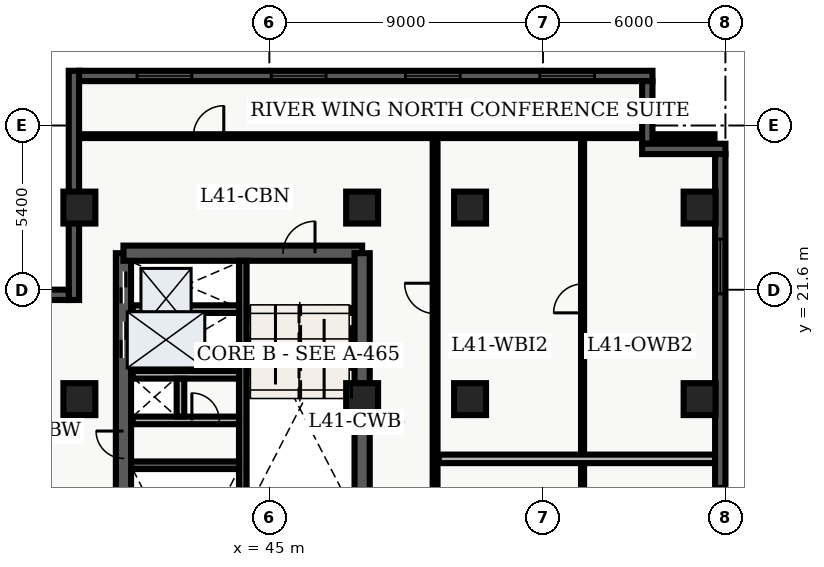
"""IFC4 building model, lengths in metres.
Left out: names, types, materials, properties, quantities, classifications, styles, units other than length and angle.
Written with IfcOpenShell. Run it as: python <this file> out.ifc"""

import sys

from ifc_helpers import new_model, entity, si_unit, converted_unit, direction, frame, origin_with_axes, origin_2d_with_axis, place, context, subcontext, project, spatial, polyline, rectangle, outline, extrude, element, fill, save


model = new_model("IFC4")
c1 = context("Model", 3, precision=1e-05, world=origin_with_axes(), true_north=direction((0.0, 1.0)))
c2 = subcontext(c1, "Body", "Model", "MODEL_VIEW")
j1 = project(units=[si_unit("LENGTHUNIT", "METRE"), converted_unit("PLANEANGLEUNIT", "DEGREE", entity("IfcPlaneAngleMeasure", 0.017), si_unit("PLANEANGLEUNIT", "RADIAN"), dimensions=[0, 0, 0, 0, 0, 0, 0])], contexts=[c1])
p1 = place(None, origin_with_axes())
s1 = spatial("IfcSite", under=j1, at=p1, CompositionType="ELEMENT")
p2 = place(p1, origin_with_axes())
s2 = spatial("IfcBuilding", under=s1, at=p2, CompositionType="ELEMENT")
p3 = place(p2, frame((0.0, 0.0, 168.0), z_axis=(0.0, 0.0, 1.0), x_axis=(1.0, 0.0, 0.0)))
s3 = spatial("IfcBuildingStorey", under=s2, at=p3, CompositionType="ELEMENT", Elevation=168.0)
p4 = place(p3, frame((40.2, 7.2, 0.0), z_axis=(0.0, 0.0, 1.0), x_axis=(0.0, 1.0, 0.0)))
e1 = element("IfcWall", 1, at=p4, inside=s3, PredefinedType="SHEAR", context=c2, shape_type="SweptSolid", body=[
    extrude(outline(polyline([(0.0, -0.25), (15.6, -0.25), (15.6, 0.25), (0.0, 0.25), (0.0, -0.25)])), origin_with_axes(), (0.0, 0.0, 1.0), 3.66),
])
p5 = place(p4, frame((14.475, 0.0, 0.0), z_axis=(0.0, 0.0, 1.0), x_axis=(1.0, 0.0, 0.0)))
e2 = element("IfcOpeningElement", 2, at=p5, cuts=e1, PredefinedType="OPENING", context=c2, shape_type="SweptSolid", body=[
    extrude(rectangle(XDim=1.05, YDim=0.52, at=origin_2d_with_axis()), origin_with_axes(), (0.0, 0.0, 1.0), 2.15),
])
p6 = place(p4, frame((12.75, 0.0, 0.0), z_axis=(0.0, 0.0, 1.0), x_axis=(1.0, 0.0, 0.0)))
e3 = element("IfcOpeningElement", 3, at=p6, cuts=e1, PredefinedType="OPENING", context=c2, shape_type="SweptSolid", body=[
    extrude(rectangle(XDim=1.2, YDim=0.52, at=origin_2d_with_axis()), origin_with_axes(), (0.0, 0.0, 1.0), 2.15),
])
p7 = place(p4, frame((9.3, 0.0, 0.0), z_axis=(0.0, 0.0, 1.0), x_axis=(1.0, 0.0, 0.0)))
e4 = element("IfcOpeningElement", 4, at=p7, cuts=e1, PredefinedType="OPENING", context=c2, shape_type="SweptSolid", body=[
    extrude(rectangle(XDim=0.9, YDim=0.52, at=origin_2d_with_axis()), origin_with_axes(), (0.0, 0.0, 1.0), 2.15),
])
p8 = place(p3, frame((40.2, 22.8, 0.0), z_axis=(0.0, 0.0, 1.0), x_axis=(1.0, 0.0, 0.0)))
e5 = element("IfcWall", 5, at=p8, inside=s3, PredefinedType="SHEAR", context=c2, shape_type="SweptSolid", body=[
    extrude(outline(polyline([(0.0, -0.25), (7.85, -0.25), (7.85, 0.25), (0.0, 0.25), (0.0, -0.25)])), origin_with_axes(), (0.0, 0.0, 1.0), 3.66),
])
p9 = place(p8, frame((5.775, 0.0, 0.0), z_axis=(0.0, 0.0, 1.0), x_axis=(1.0, 0.0, 0.0)))
e6 = element("IfcOpeningElement", 6, at=p9, cuts=e5, PredefinedType="OPENING", context=c2, shape_type="SweptSolid", body=[
    extrude(rectangle(XDim=1.05, YDim=0.52, at=origin_2d_with_axis()), origin_with_axes(), (0.0, 0.0, 1.0), 2.15),
])
p10 = place(p3, frame((48.05, 7.2, 0.0), z_axis=(0.0, 0.0, 1.0), x_axis=(0.0, 1.0, 0.0)))
e7 = element("IfcWall", 7, at=p10, inside=s3, PredefinedType="SHEAR", context=c2, shape_type="SweptSolid", body=[
    extrude(outline(polyline([(0.0, -0.25), (15.6, -0.25), (15.6, 0.25), (0.0, 0.25), (0.0, -0.25)])), origin_with_axes(), (0.0, 0.0, 1.0), 3.66),
])
p11 = place(p10, frame((5.975, 0.0, 0.0), z_axis=(0.0, 0.0, 1.0), x_axis=(1.0, 0.0, 0.0)))
e8 = element("IfcOpeningElement", 8, at=p11, cuts=e7, PredefinedType="OPENING", context=c2, shape_type="SweptSolid", body=[
    extrude(rectangle(XDim=1.05, YDim=0.52, at=origin_2d_with_axis()), origin_with_axes(), (0.0, 0.0, 1.0), 2.15),
])
p12 = place(p10, frame((2.725, 0.0, 0.0), z_axis=(0.0, 0.0, 1.0), x_axis=(1.0, 0.0, 0.0)))
e9 = element("IfcOpeningElement", 9, at=p12, cuts=e7, PredefinedType="OPENING", context=c2, shape_type="SweptSolid", body=[
    extrude(rectangle(XDim=0.95, YDim=0.52, at=origin_2d_with_axis()), origin_with_axes(), (0.0, 0.0, 1.0), 2.15),
])
p13 = place(p3, frame((44.125, 7.45, 0.0), z_axis=(0.0, 0.0, 1.0), x_axis=(0.0, 1.0, 0.0)))
e10 = element("IfcWall", 10, at=p13, inside=s3, PredefinedType="SHEAR", context=c2, shape_type="SweptSolid", body=[
    extrude(outline(polyline([(0.0, -0.125), (15.1, -0.125), (15.1, 0.125), (0.0, 0.125), (0.0, -0.125)])), origin_with_axes(), (0.0, 0.0, 1.0), 3.66),
])
p14 = place(p3, frame((40.45, 15.825, 0.0), z_axis=(0.0, 0.0, 1.0), x_axis=(1.0, 0.0, 0.0)))
e11 = element("IfcWall", 11, at=p14, inside=s3, PredefinedType="SHEAR", context=c2, shape_type="SweptSolid", body=[
    extrude(outline(polyline([(0.0, -0.125), (3.55, -0.125), (3.55, 0.125), (0.0, 0.125), (0.0, -0.125)])), origin_with_axes(), (0.0, 0.0, 1.0), 3.66),
])
p15 = place(p3, frame((40.5, 17.3, 0.0), z_axis=(0.0, 0.0, 1.0), x_axis=(1.0, 0.0, 0.0)))
e12 = element("IfcWall", 12, at=p15, inside=s3, PredefinedType="SOLIDWALL", context=c2, shape_type="SweptSolid", body=[
    extrude(outline(polyline([(0.0, -0.125), (3.5, -0.125), (3.5, 0.125), (0.0, 0.125), (0.0, -0.125)])), origin_with_axes(), (0.0, 0.0, 1.0), 2.7),
])
p16 = place(p15, frame((2.4, 0.0, 0.0), z_axis=(0.0, 0.0, 1.0), x_axis=(1.0, 0.0, 0.0)))
e13 = element("IfcOpeningElement", 13, at=p16, cuts=e12, PredefinedType="OPENING", context=c2, shape_type="SweptSolid", body=[
    extrude(rectangle(XDim=0.9, YDim=0.27, at=origin_2d_with_axis()), origin_with_axes(), (0.0, 0.0, 1.0), 2.15),
])
p17 = place(p3, frame((40.5, 18.8, 0.0), z_axis=(0.0, 0.0, 1.0), x_axis=(1.0, 0.0, 0.0)))
e14 = element("IfcWall", 14, at=p17, inside=s3, PredefinedType="SOLIDWALL", context=c2, shape_type="SweptSolid", body=[
    extrude(outline(polyline([(0.0, -0.125), (3.5, -0.125), (3.5, 0.125), (0.0, 0.125), (0.0, -0.125)])), origin_with_axes(), (0.0, 0.0, 1.0), 2.7),
])
p18 = place(p3, frame((42.075, 17.43, 0.0), z_axis=(0.0, 0.0, 1.0), x_axis=(0.0, 1.0, 0.0)))
e15 = element("IfcWall", 15, at=p18, inside=s3, PredefinedType="SOLIDWALL", context=c2, shape_type="SweptSolid", body=[
    extrude(outline(polyline([(0.0, -0.125), (1.24, -0.125), (1.24, 0.125), (0.0, 0.125), (0.0, -0.125)])), origin_with_axes(), (0.0, 0.0, 1.0), 2.7),
])
for number, where, z_axis, x_axis in (
    (16, (38.75, 18.0, 0.0), (0.0, 0.0, 1.0), (1.0, 0.0, 0.0)),
    (17, (38.75, 24.3, 0.0), (0.0, 0.0, 1.0), (1.0, 0.0, 0.0)),
    (18, (48.05, 18.0, 0.0), (0.0, 0.0, 1.0), (1.0, 0.0, 0.0)),
    (19, (48.05, 24.3, 0.0), (0.0, 0.0, 1.0), (1.0, 0.0, 0.0)),
    (20, (51.6, 18.0, 0.0), (0.0, 0.0, 1.0), (1.0, 0.0, 0.0)),
    (21, (51.6, 24.3, 0.0), (0.0, 0.0, 1.0), (1.0, 0.0, 0.0)),
    (22, (59.15, 18.0, 0.0), (0.0, 0.0, 1.0), (1.0, 0.0, 0.0)),
    (23, (59.15, 24.3, 0.0), (0.0, 0.0, 1.0), (1.0, 0.0, 0.0)),
):
    element("IfcColumn", number, at=place(p3, frame(where, z_axis=z_axis, x_axis=x_axis)), inside=s3, PredefinedType="COLUMN", context=c2, shape_type="SweptSolid", body=[
        extrude(rectangle(XDim=1.05, YDim=1.05, at=origin_2d_with_axis()), origin_with_axes(), (0.0, 0.0, 1.0), 3.9),
    ])
p19 = place(p3, frame((40.5, 20.96, 0.0), z_axis=(0.0, 0.0, 1.0), x_axis=(1.0, 0.0, 0.0)))
e24 = element("IfcWall", 24, at=p19, inside=s3, PredefinedType="SOLIDWALL", context=c2, shape_type="SweptSolid", body=[
    extrude(outline(polyline([(0.0, -0.125), (3.5, -0.125), (3.5, 0.125), (0.0, 0.125), (0.0, -0.125)])), origin_with_axes(), (0.0, 0.0, 1.0), 2.7),
])
p20 = place(p3, frame((50.45, 7.85, 0.0), z_axis=(0.0, 0.0, 1.0), x_axis=(0.0, 1.0, 0.0)))
e25 = element("IfcWall", 25, at=p20, inside=s3, PredefinedType="PARTITIONING", context=c2, shape_type="SweptSolid", body=[
    extrude(outline(polyline([(0.0, -0.08), (18.8, -0.08), (18.8, 0.08), (0.0, 0.08), (0.0, -0.08)])), origin_with_axes(), (0.0, 0.0, 1.0), 2.7),
])
p21 = place(p20, frame((4.122, 0.0, 0.0), z_axis=(0.0, 0.0, 1.0), x_axis=(1.0, 0.0, 0.0)))
e26 = element("IfcOpeningElement", 26, at=p21, cuts=e25, PredefinedType="OPENING", context=c2, shape_type="SweptSolid", body=[
    extrude(rectangle(XDim=1.0, YDim=0.18, at=origin_2d_with_axis()), origin_with_axes(), (0.0, 0.0, 1.0), 2.15),
])
p22 = place(p20, frame((13.463, 0.0, 0.0), z_axis=(0.0, 0.0, 1.0), x_axis=(1.0, 0.0, 0.0)))
e27 = element("IfcOpeningElement", 27, at=p22, cuts=e25, PredefinedType="OPENING", context=c2, shape_type="SweptSolid", body=[
    extrude(rectangle(XDim=1.0, YDim=0.18, at=origin_2d_with_axis()), origin_with_axes(), (0.0, 0.0, 1.0), 2.15),
])
p23 = place(p3, frame((38.735, 26.65, 0.0), z_axis=(0.0, 0.0, 1.0), x_axis=(1.0, 0.0, 0.0)))
e28 = element("IfcWall", 28, at=p23, inside=s3, PredefinedType="PARTITIONING", context=c2, shape_type="SweptSolid", body=[
    extrude(outline(polyline([(0.0, -0.062), (20.905, -0.062), (20.905, 0.062), (0.0, 0.062), (0.0, -0.062)])), origin_with_axes(), (0.0, 0.0, 1.0), 2.7),
])
p24 = place(p23, frame((4.265, 0.0, 0.0), z_axis=(0.0, 0.0, 1.0), x_axis=(1.0, 0.0, 0.0)))
e29 = element("IfcOpeningElement", 29, at=p24, cuts=e28, PredefinedType="OPENING", context=c2, shape_type="SweptSolid", body=[
    extrude(rectangle(XDim=1.0, YDim=0.145, at=origin_2d_with_axis()), origin_with_axes(), (0.0, 0.0, 1.0), 2.15),
])
p25 = place(p3, frame((55.3, 7.98, 0.0), z_axis=(0.0, 0.0, 1.0), x_axis=(0.0, 1.0, 0.0)))
e30 = element("IfcWall", 30, at=p25, inside=s3, PredefinedType="PARTITIONING", context=c2, shape_type="SweptSolid", body=[
    extrude(outline(polyline([(0.0, -0.05), (18.54, -0.05), (18.54, 0.05), (0.0, 0.05), (0.0, -0.05)])), origin_with_axes(), (0.0, 0.0, 1.0), 2.7),
])
p26 = place(p25, frame((3.993, 0.0, 0.0), z_axis=(0.0, 0.0, 1.0), x_axis=(1.0, 0.0, 0.0)))
e31 = element("IfcOpeningElement", 31, at=p26, cuts=e30, PredefinedType="OPENING", context=c2, shape_type="SweptSolid", body=[
    extrude(rectangle(XDim=0.95, YDim=0.12, at=origin_2d_with_axis()), origin_with_axes(), (0.0, 0.0, 1.0), 2.15),
])
p27 = place(p25, frame((13.332, 0.0, 0.0), z_axis=(0.0, 0.0, 1.0), x_axis=(1.0, 0.0, 0.0)))
e32 = element("IfcOpeningElement", 32, at=p27, cuts=e30, PredefinedType="OPENING", context=c2, shape_type="SweptSolid", body=[
    extrude(rectangle(XDim=0.95, YDim=0.12, at=origin_2d_with_axis()), origin_with_axes(), (0.0, 0.0, 1.0), 2.15),
])
p28 = place(p3, frame((50.57, 16.035, 0.0), z_axis=(0.0, 0.0, 1.0), x_axis=(1.0, 0.0, 0.0)))
e33 = element("IfcWall", 33, at=p28, inside=s3, PredefinedType="PARTITIONING", context=c2, shape_type="SweptSolid", body=[
    extrude(outline(polyline([(0.0, -0.14), (9.095, -0.14), (9.095, 0.14), (0.0, 0.14), (0.0, -0.14)])), origin_with_axes(), (0.0, 0.0, 1.0), 2.7),
])
p29 = place(p3, frame((38.57, 21.26, 0.0), z_axis=(0.0, 0.0, 1.0), x_axis=(0.0, 1.0, 0.0)))
e34 = element("IfcWall", 34, at=p29, inside=s3, PredefinedType="SOLIDWALL", context=c2, shape_type="SweptSolid", body=[
    extrude(outline(polyline([(0.0, -0.17), (7.54, -0.17), (7.54, 0.17), (0.0, 0.17), (0.0, -0.17)])), origin_with_axes(), (0.0, 0.0, 1.0), 3.66),
])
p30 = place(p3, frame((38.74, 28.63, 0.0), z_axis=(0.0, 0.0, 1.0), x_axis=(1.0, 0.0, 0.0)))
e35 = element("IfcWall", 35, at=p30, inside=s3, PredefinedType="SOLIDWALL", context=c2, shape_type="SweptSolid", body=[
    extrude(outline(polyline([(0.0, -0.17), (18.86, -0.17), (18.86, 0.17), (0.0, 0.17), (0.0, -0.17)])), origin_with_axes(), (0.0, 0.0, 1.0), 3.66),
])
p31 = place(p30, frame((2.808, 0.0, 0.45), z_axis=(0.0, 0.0, 1.0), x_axis=(1.0, 0.0, 0.0)))
e36 = element("IfcOpeningElement", 36, at=p31, cuts=e35, PredefinedType="OPENING", context=c2, shape_type="SweptSolid", body=[
    extrude(rectangle(XDim=1.8, YDim=0.36, at=origin_2d_with_axis()), origin_with_axes(), (0.0, 0.0, 1.0), 2.1),
])
p32 = place(p30, frame((7.222, 0.0, 0.45), z_axis=(0.0, 0.0, 1.0), x_axis=(1.0, 0.0, 0.0)))
e37 = element("IfcOpeningElement", 37, at=p32, cuts=e35, PredefinedType="OPENING", context=c2, shape_type="SweptSolid", body=[
    extrude(rectangle(XDim=1.8, YDim=0.36, at=origin_2d_with_axis()), origin_with_axes(), (0.0, 0.0, 1.0), 2.1),
])
p33 = place(p30, frame((11.637, 0.0, 0.45), z_axis=(0.0, 0.0, 1.0), x_axis=(1.0, 0.0, 0.0)))
e38 = element("IfcOpeningElement", 38, at=p33, cuts=e35, PredefinedType="OPENING", context=c2, shape_type="SweptSolid", body=[
    extrude(rectangle(XDim=1.8, YDim=0.36, at=origin_2d_with_axis()), origin_with_axes(), (0.0, 0.0, 1.0), 2.1),
])
p34 = place(p30, frame((16.053, 0.0, 0.45), z_axis=(0.0, 0.0, 1.0), x_axis=(1.0, 0.0, 0.0)))
e39 = element("IfcOpeningElement", 39, at=p34, cuts=e35, PredefinedType="OPENING", context=c2, shape_type="SweptSolid", body=[
    extrude(rectangle(XDim=1.8, YDim=0.36, at=origin_2d_with_axis()), origin_with_axes(), (0.0, 0.0, 1.0), 2.1),
])
p35 = place(p3, frame((57.43, 28.46, 0.0), z_axis=(0.0, 0.0, 1.0), x_axis=(0.0, -1.0, 0.0)))
e40 = element("IfcWall", 40, at=p35, inside=s3, PredefinedType="SOLIDWALL", context=c2, shape_type="SweptSolid", body=[
    extrude(outline(polyline([(0.0, -0.17), (2.06, -0.17), (2.06, 0.17), (0.0, 0.17), (0.0, -0.17)])), origin_with_axes(), (0.0, 0.0, 1.0), 3.66),
])
p36 = place(p3, frame((57.26, 26.23, 0.0), z_axis=(0.0, 0.0, 1.0), x_axis=(1.0, 0.0, 0.0)))
e41 = element("IfcWall", 41, at=p36, inside=s3, PredefinedType="SOLIDWALL", context=c2, shape_type="SweptSolid", body=[
    extrude(outline(polyline([(0.0, -0.17), (2.74, -0.17), (2.74, 0.17), (0.0, 0.17), (0.0, -0.17)])), origin_with_axes(), (0.0, 0.0, 1.0), 3.66),
])
p37 = place(p3, frame((59.83, 26.06, 0.0), z_axis=(0.0, 0.0, 1.0), x_axis=(0.0, -1.0, 0.0)))
e42 = element("IfcWall", 42, at=p37, inside=s3, PredefinedType="SOLIDWALL", context=c2, shape_type="SweptSolid", body=[
    extrude(outline(polyline([(0.0, -0.17), (23.66, -0.17), (23.66, 0.17), (0.0, 0.17), (0.0, -0.17)])), origin_with_axes(), (0.0, 0.0, 1.0), 3.66),
])
p38 = place(p37, frame((3.696, 0.0, 0.45), z_axis=(0.0, 0.0, 1.0), x_axis=(1.0, 0.0, 0.0)))
e43 = element("IfcOpeningElement", 43, at=p38, cuts=e42, PredefinedType="OPENING", context=c2, shape_type="SweptSolid", body=[
    extrude(rectangle(XDim=1.8, YDim=0.36, at=origin_2d_with_axis()), origin_with_axes(), (0.0, 0.0, 1.0), 2.1),
])
p39 = place(p37, frame((11.83, 0.0, 0.45), z_axis=(0.0, 0.0, 1.0), x_axis=(1.0, 0.0, 0.0)))
e44 = element("IfcOpeningElement", 44, at=p39, cuts=e42, PredefinedType="OPENING", context=c2, shape_type="SweptSolid", body=[
    extrude(rectangle(XDim=1.8, YDim=0.36, at=origin_2d_with_axis()), origin_with_axes(), (0.0, 0.0, 1.0), 2.1),
])
p40 = place(p37, frame((20.364, 0.0, 0.45), z_axis=(0.0, 0.0, 1.0), x_axis=(1.0, 0.0, 0.0)))
e45 = element("IfcOpeningElement", 45, at=p40, cuts=e42, PredefinedType="OPENING", context=c2, shape_type="SweptSolid", body=[
    extrude(rectangle(XDim=1.8, YDim=0.36, at=origin_2d_with_axis()), origin_with_axes(), (0.0, 0.0, 1.0), 2.1),
])
p41 = place(p3, frame((23.919, 21.43, 0.0), z_axis=(0.0, 0.0, 1.0), x_axis=(1.0, 0.0, 0.0)))
e46 = element("IfcWall", 46, at=p41, inside=s3, PredefinedType="SOLIDWALL", context=c2, shape_type="SweptSolid", body=[
    extrude(outline(polyline([(0.0, -0.17), (14.481, -0.17), (14.481, 0.17), (0.0, 0.17), (0.0, -0.17)])), origin_with_axes(), (0.0, 0.0, 1.0), 3.66),
])
p42 = place(p41, frame((3.663, 0.0, 0.45), z_axis=(0.0, 0.0, 1.0), x_axis=(1.0, 0.0, 0.0)))
e47 = element("IfcOpeningElement", 47, at=p42, cuts=e46, PredefinedType="OPENING", context=c2, shape_type="SweptSolid", body=[
    extrude(rectangle(XDim=1.8, YDim=0.36, at=origin_2d_with_axis()), origin_with_axes(), (0.0, 0.0, 1.0), 2.1),
])
p43 = place(p41, frame((6.79, 0.0, 0.45), z_axis=(0.0, 0.0, 1.0), x_axis=(1.0, 0.0, 0.0)))
e48 = element("IfcOpeningElement", 48, at=p43, cuts=e46, PredefinedType="OPENING", context=c2, shape_type="SweptSolid", body=[
    extrude(rectangle(XDim=1.8, YDim=0.36, at=origin_2d_with_axis()), origin_with_axes(), (0.0, 0.0, 1.0), 2.1),
])
p44 = place(p41, frame((10.817, 0.0, 0.45), z_axis=(0.0, 0.0, 1.0), x_axis=(1.0, 0.0, 0.0)))
e49 = element("IfcOpeningElement", 49, at=p44, cuts=e46, PredefinedType="OPENING", context=c2, shape_type="SweptSolid", body=[
    extrude(rectangle(XDim=1.8, YDim=0.36, at=origin_2d_with_axis()), origin_with_axes(), (0.0, 0.0, 1.0), 2.1),
])
p45 = place(p4, frame((14.475, 0.0, 0.0), z_axis=(0.0, 0.0, 1.0), x_axis=(1.0, 0.0, 0.0)))
e50 = element("IfcDoor", 50, at=p45, inside=s3, OperationType="SLIDING_TO_RIGHT", PredefinedType="DOOR", context=c2, shape_type="SweptSolid", body=[
    extrude(rectangle(XDim=1.05, YDim=0.09, at=origin_2d_with_axis()), origin_with_axes(), (0.0, 0.0, 1.0), 2.15),
])
fill(e2, e50)
p46 = place(p4, frame((12.75, 0.0, 0.0), z_axis=(0.0, 0.0, 1.0), x_axis=(1.0, 0.0, 0.0)))
e51 = element("IfcDoor", 51, at=p46, inside=s3, OperationType="DOUBLE_DOOR_SLIDING", PredefinedType="DOOR", context=c2, shape_type="SweptSolid", body=[
    extrude(rectangle(XDim=1.2, YDim=0.09, at=origin_2d_with_axis()), origin_with_axes(), (0.0, 0.0, 1.0), 2.15),
])
fill(e3, e51)
p47 = place(p4, frame((9.3, 0.0, 0.0), z_axis=(0.0, 0.0, 1.0), x_axis=(1.0, 0.0, 0.0)))
e52 = element("IfcDoor", 52, at=p47, inside=s3, OperationType="SINGLE_SWING_RIGHT", PredefinedType="DOOR", context=c2, shape_type="SweptSolid", body=[
    extrude(rectangle(XDim=0.9, YDim=0.09, at=origin_2d_with_axis()), origin_with_axes(), (0.0, 0.0, 1.0), 2.15),
])
fill(e4, e52)
p48 = place(p15, frame((2.4, 0.0, 0.0), z_axis=(0.0, 0.0, 1.0), x_axis=(1.0, 0.0, 0.0)))
e53 = element("IfcDoor", 53, at=p48, inside=s3, OperationType="SINGLE_SWING_LEFT", PredefinedType="DOOR", context=c2, shape_type="SweptSolid", body=[
    extrude(rectangle(XDim=0.9, YDim=0.09, at=origin_2d_with_axis()), origin_with_axes(), (0.0, 0.0, 1.0), 2.15),
])
fill(e13, e53)
p49 = place(p8, frame((5.775, 0.0, 0.0), z_axis=(0.0, 0.0, 1.0), x_axis=(1.0, 0.0, 0.0)))
e54 = element("IfcDoor", 54, at=p49, inside=s3, OperationType="SINGLE_SWING_RIGHT", PredefinedType="DOOR", context=c2, shape_type="SweptSolid", body=[
    extrude(rectangle(XDim=1.05, YDim=0.09, at=origin_2d_with_axis()), origin_with_axes(), (0.0, 0.0, 1.0), 2.15),
])
fill(e6, e54)
p50 = place(p23, frame((4.265, 0.0, 0.0), z_axis=(0.0, 0.0, 1.0), x_axis=(1.0, 0.0, 0.0)))
e55 = element("IfcDoor", 55, at=p50, inside=s3, OperationType="SINGLE_SWING_RIGHT", PredefinedType="DOOR", context=c2, shape_type="SweptSolid", body=[
    extrude(rectangle(XDim=1.0, YDim=0.075, at=origin_2d_with_axis()), origin_with_axes(), (0.0, 0.0, 1.0), 2.15),
])
fill(e29, e55)
p51 = place(p25, frame((13.332, 0.0, 0.0), z_axis=(0.0, 0.0, 1.0), x_axis=(1.0, 0.0, 0.0)))
e56 = element("IfcDoor", 56, at=p51, inside=s3, OperationType="SINGLE_SWING_LEFT", PredefinedType="DOOR", context=c2, shape_type="SweptSolid", body=[
    extrude(rectangle(XDim=0.95, YDim=0.06, at=origin_2d_with_axis()), origin_with_axes(), (0.0, 0.0, 1.0), 2.15),
])
fill(e32, e56)
p52 = place(p20, frame((13.463, 0.0, 0.0), z_axis=(0.0, 0.0, 1.0), x_axis=(1.0, 0.0, 0.0)))
e57 = element("IfcDoor", 57, at=p52, inside=s3, OperationType="SINGLE_SWING_RIGHT", PredefinedType="DOOR", context=c2, shape_type="SweptSolid", body=[
    extrude(rectangle(XDim=1.0, YDim=0.09, at=origin_2d_with_axis()), origin_with_axes(), (0.0, 0.0, 1.0), 2.15),
])
fill(e27, e57)
p53 = place(p30, frame((2.808, 0.0, 0.45), z_axis=(0.0, 0.0, 1.0), x_axis=(1.0, 0.0, 0.0)))
e58 = element("IfcWindow", 58, at=p53, inside=s3, PredefinedType="WINDOW", context=c2, shape_type="SweptSolid", body=[
    extrude(rectangle(XDim=1.8, YDim=0.09, at=origin_2d_with_axis()), origin_with_axes(), (0.0, 0.0, 1.0), 2.1),
])
fill(e36, e58)
p54 = place(p30, frame((7.222, 0.0, 0.45), z_axis=(0.0, 0.0, 1.0), x_axis=(1.0, 0.0, 0.0)))
e59 = element("IfcWindow", 59, at=p54, inside=s3, PredefinedType="WINDOW", context=c2, shape_type="SweptSolid", body=[
    extrude(rectangle(XDim=1.8, YDim=0.09, at=origin_2d_with_axis()), origin_with_axes(), (0.0, 0.0, 1.0), 2.1),
])
fill(e37, e59)
p55 = place(p30, frame((11.637, 0.0, 0.45), z_axis=(0.0, 0.0, 1.0), x_axis=(1.0, 0.0, 0.0)))
e60 = element("IfcWindow", 60, at=p55, inside=s3, PredefinedType="WINDOW", context=c2, shape_type="SweptSolid", body=[
    extrude(rectangle(XDim=1.8, YDim=0.09, at=origin_2d_with_axis()), origin_with_axes(), (0.0, 0.0, 1.0), 2.1),
])
fill(e38, e60)
p56 = place(p30, frame((16.053, 0.0, 0.45), z_axis=(0.0, 0.0, 1.0), x_axis=(1.0, 0.0, 0.0)))
e61 = element("IfcWindow", 61, at=p56, inside=s3, PredefinedType="WINDOW", context=c2, shape_type="SweptSolid", body=[
    extrude(rectangle(XDim=1.8, YDim=0.09, at=origin_2d_with_axis()), origin_with_axes(), (0.0, 0.0, 1.0), 2.1),
])
fill(e39, e61)
p57 = place(p37, frame((3.696, 0.0, 0.45), z_axis=(0.0, 0.0, 1.0), x_axis=(1.0, 0.0, 0.0)))
e62 = element("IfcWindow", 62, at=p57, inside=s3, PredefinedType="WINDOW", context=c2, shape_type="SweptSolid", body=[
    extrude(rectangle(XDim=1.8, YDim=0.09, at=origin_2d_with_axis()), origin_with_axes(), (0.0, 0.0, 1.0), 2.1),
])
fill(e43, e62)
p58 = place(p37, frame((11.83, 0.0, 0.45), z_axis=(0.0, 0.0, 1.0), x_axis=(1.0, 0.0, 0.0)))
e63 = element("IfcWindow", 63, at=p58, inside=s3, PredefinedType="WINDOW", context=c2, shape_type="SweptSolid", body=[
    extrude(rectangle(XDim=1.8, YDim=0.09, at=origin_2d_with_axis()), origin_with_axes(), (0.0, 0.0, 1.0), 2.1),
])
fill(e44, e63)
save(model, sys.argv[1])
